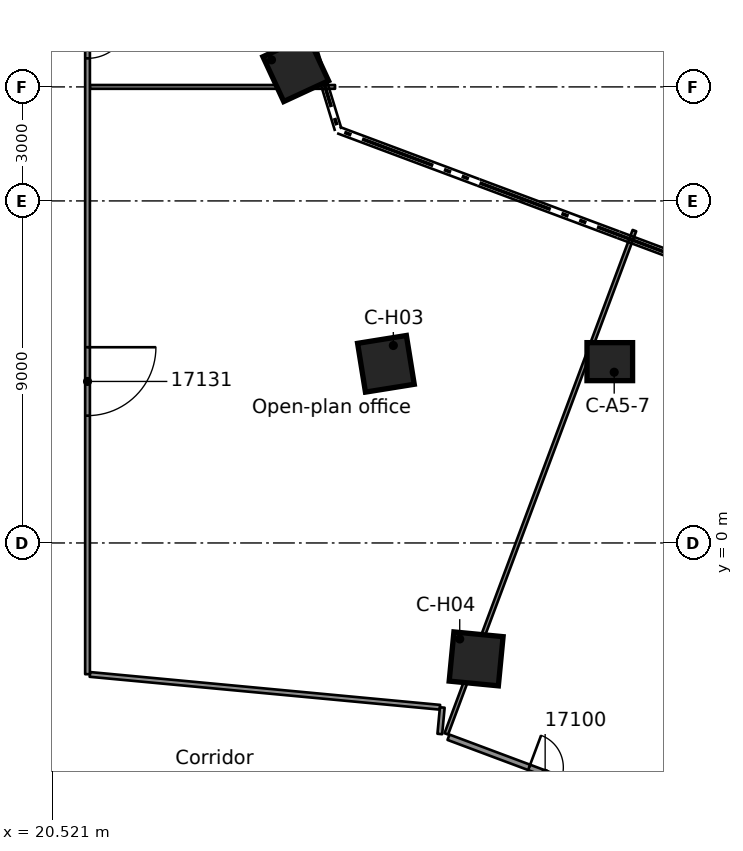
"""IFC4 building model, lengths in metres.
Left out: names, types, materials, properties, quantities, classifications, styles, units other than length and angle.
Written with IfcOpenShell. Run it as: python <this file> out.ifc"""

import sys

from ifc_helpers import new_model, si_unit, direction, frame, frame_2d, origin, origin_2d, place, context, subcontext, project, spatial, rectangle, extrude, element, fill, save


model = new_model("IFC4")
c1 = context("Model", 3, precision=1e-05, world=origin(), true_north=direction((0.0, 1.0)))
c2 = subcontext(c1, "Body", "Model", "MODEL_VIEW")
j1 = project(units=[si_unit("LENGTHUNIT", "METRE"), si_unit("PLANEANGLEUNIT", "RADIAN")], contexts=[c1])
p1 = place(None, origin())
s1 = spatial("IfcSite", under=j1, at=p1, CompositionType="ELEMENT")
p2 = place(p1, origin())
s2 = spatial("IfcBuilding", under=s1, at=p2, CompositionType="ELEMENT")
p3 = place(p2, frame((0.0, 0.0, 84.2)))
s3 = spatial("IfcBuildingStorey", under=s2, at=p3, CompositionType="ELEMENT", Elevation=84.2)
p4 = place(p3, frame((35.193, 4.771, 0.0), z_axis=(0.0, 0.0, 1.0), x_axis=(1.0, 0.0, 0.0)))
e1 = element("IfcColumn", 1, at=p4, inside=s3, PredefinedType="COLUMN", context=c2, shape_type="SweptSolid", body=[
    extrude(rectangle(XDim=1.2, YDim=1.0, at=origin_2d()), origin(), (0.0, 0.0, 1.0), 3.5),
])
for number, where, z_axis, x_axis in (
    (2, (26.929, 12.478, 0.0), (0.0, 0.0, 1.0), (0.907, 0.42, 0.0)),
    (3, (29.302, 4.714, 0.0), (0.0, 0.0, 1.0), (0.987, 0.159, 0.0)),
    (4, (31.676, -3.05, 0.0), (0.0, 0.0, 1.0), (0.995, -0.096, 0.0)),
):
    element("IfcColumn", number, at=place(p3, frame(where, z_axis=z_axis, x_axis=x_axis)), inside=s3, PredefinedType="COLUMN", context=c2, shape_type="SweptSolid", body=[
        extrude(rectangle(XDim=1.3, YDim=1.3, at=origin_2d()), origin(), (0.0, 0.0, 1.0), 3.5),
    ])
p5 = place(p3, frame((30.949, -5.112, 0.0), z_axis=(0.0, 0.0, 1.0), x_axis=(0.936693201773, -0.350151175568, 0.0)))
e5 = element("IfcWall", 5, at=p5, inside=s3, PredefinedType="PARTITIONING", context=c2, shape_type="SweptSolid", body=[
    extrude(rectangle(XDim=22.019, YDim=0.15, at=frame_2d((11.01, 0.0))), origin(), (0.0, 0.0, 1.0), 3.08),
])
p6 = place(p5, frame((2.265, 0.0, 0.0)))
e6 = element("IfcOpeningElement", 6, at=p6, cuts=e5, PredefinedType="OPENING", context=c2, shape_type="SweptSolid", body=[
    extrude(rectangle(XDim=0.9, YDim=2.1, at=frame_2d((0.45, 1.05))), frame((0.0, 0.085, 0.0), z_axis=(0.0, -1.0, 0.0), x_axis=(1.0, 0.0, 0.0)), (0.0, 0.0, 1.0), 0.17),
])
p7 = place(p5, frame((9.021, 0.0, 0.0)))
e7 = element("IfcOpeningElement", 7, at=p7, cuts=e5, PredefinedType="OPENING", context=c2, shape_type="SweptSolid", body=[
    extrude(rectangle(XDim=0.9, YDim=2.1, at=frame_2d((0.45, 1.05))), frame((0.0, 0.085, 0.0), z_axis=(0.0, -1.0, 0.0), x_axis=(1.0, 0.0, 0.0)), (0.0, 0.0, 1.0), 0.17),
])
p8 = place(p5, frame((13.171, 0.0, 0.0)))
e8 = element("IfcOpeningElement", 8, at=p8, cuts=e5, PredefinedType="OPENING", context=c2, shape_type="SweptSolid", body=[
    extrude(rectangle(XDim=0.9, YDim=2.1, at=frame_2d((0.45, 1.05))), frame((0.0, 0.085, 0.0), z_axis=(0.0, -1.0, 0.0), x_axis=(1.0, 0.0, 0.0)), (0.0, 0.0, 1.0), 0.17),
])
p9 = place(p5, frame((18.271, 0.0, 0.0)))
e9 = element("IfcOpeningElement", 9, at=p9, cuts=e5, PredefinedType="OPENING", context=c2, shape_type="SweptSolid", body=[
    extrude(rectangle(XDim=1.8, YDim=2.1, at=frame_2d((0.9, 1.05))), frame((0.0, 0.085, 0.0), z_axis=(0.0, -1.0, 0.0), x_axis=(1.0, 0.0, 0.0)), (0.0, 0.0, 1.0), 0.17),
])
p10 = place(p3, frame((21.512, -3.459, 0.0), z_axis=(0.0, 0.0, 1.0), x_axis=(0.995629319732, -0.093393028057, 0.0)))
e10 = element("IfcWall", 10, at=p10, inside=s3, PredefinedType="PARTITIONING", context=c2, shape_type="SweptSolid", body=[
    extrude(rectangle(XDim=9.251, YDim=0.125, at=frame_2d((4.626, 0.0))), origin(), (0.0, 0.0, 1.0), 3.08),
])
p11 = place(p3, frame((21.512, 12.0, 0.0), z_axis=(0.0, 0.0, 1.0), x_axis=(1.0, 0.0, 0.0)))
e11 = element("IfcWall", 11, at=p11, inside=s3, PredefinedType="PARTITIONING", context=c2, shape_type="SweptSolid", body=[
    extrude(rectangle(XDim=6.451, YDim=0.1, at=frame_2d((3.226, 0.0))), origin(), (0.0, 0.0, 1.0), 3.08),
])
p12 = place(p3, frame((30.891, -5.023, 0.0), z_axis=(0.0, 0.0, 1.0), x_axis=(0.350144786727, 0.936695590001, 0.0)))
e12 = element("IfcWall", 12, at=p12, inside=s3, PredefinedType="PARTITIONING", context=c2, shape_type="SweptSolid", body=[
    extrude(rectangle(XDim=14.137, YDim=0.1, at=frame_2d((7.068, 0.0))), origin(), (0.0, 0.0, 1.0), 3.08),
])
p13 = place(p3, frame((30.72, -5.026, 0.0), z_axis=(0.0, 0.0, 1.0), x_axis=(0.092800329534, 0.995684738679, 0.0)))
e13 = element("IfcWall", 13, at=p13, inside=s3, PredefinedType="PARTITIONING", context=c2, shape_type="SweptSolid", body=[
    extrude(rectangle(XDim=0.7, YDim=0.125, at=frame_2d((0.35, 0.0))), origin(), (0.0, 0.0, 1.0), 3.08),
])
p14 = place(p3, frame((21.45, 14.451, 0.0), z_axis=(0.0, 0.0, 1.0), x_axis=(0.0, -1.0, 0.0)))
e14 = element("IfcWall", 14, at=p14, inside=s3, PredefinedType="PARTITIONING", context=c2, shape_type="SweptSolid", body=[
    extrude(rectangle(XDim=17.904, YDim=0.125, at=frame_2d((8.952, 0.0))), origin(), (0.0, 0.0, 1.0), 3.08),
])
p15 = place(p14, frame((9.301, 0.0, 0.0)))
e15 = element("IfcOpeningElement", 15, at=p15, cuts=e14, PredefinedType="OPENING", context=c2, shape_type="SweptSolid", body=[
    extrude(rectangle(XDim=1.8, YDim=2.1, at=frame_2d((0.9, 1.05))), frame((0.0, 0.073, 0.0), z_axis=(0.0, -1.0, 0.0), x_axis=(1.0, 0.0, 0.0)), (0.0, 0.0, 1.0), 0.145),
])
p16 = place(p14, frame((0.6, 0.0, 0.0)))
e16 = element("IfcOpeningElement", 16, at=p16, cuts=e14, PredefinedType="OPENING", context=c2, shape_type="SweptSolid", body=[
    extrude(rectangle(XDim=1.1, YDim=2.1, at=frame_2d((0.55, 1.05))), frame((0.0, 0.073, 0.0), z_axis=(0.0, -1.0, 0.0), x_axis=(1.0, 0.0, 0.0)), (0.0, 0.0, 1.0), 0.145),
])
p17 = place(p6, origin())
e17 = element("IfcDoor", 17, at=p17, inside=s3, OperationType="SINGLE_SWING_LEFT", PredefinedType="DOOR", context=c2, shape_type="SweptSolid", body=[
    extrude(rectangle(XDim=0.9, YDim=2.1, at=frame_2d((0.45, 1.05))), frame((0.0, 0.025, 0.0), z_axis=(0.0, -1.0, 0.0), x_axis=(1.0, 0.0, 0.0)), (0.0, 0.0, 1.0), 0.05),
])
fill(e6, e17)
p18 = place(p15, origin())
e18 = element("IfcDoor", 18, at=p18, inside=s3, OperationType="DOUBLE_DOOR_SINGLE_SWING", PredefinedType="DOOR", context=c2, shape_type="SweptSolid", body=[
    extrude(rectangle(XDim=1.8, YDim=2.1, at=frame_2d((0.9, 1.05))), frame((0.0, 0.025, 0.0), z_axis=(0.0, -1.0, 0.0), x_axis=(1.0, 0.0, 0.0)), (0.0, 0.0, 1.0), 0.05),
])
fill(e15, e18)
p19 = place(p16, origin())
e19 = element("IfcDoor", 19, at=p19, inside=s3, OperationType="SINGLE_SWING_LEFT", PredefinedType="DOOR", context=c2, shape_type="SweptSolid", body=[
    extrude(rectangle(XDim=1.1, YDim=2.1, at=frame_2d((0.55, 1.05))), frame((0.0, 0.025, 0.0), z_axis=(0.0, -1.0, 0.0), x_axis=(1.0, 0.0, 0.0)), (0.0, 0.0, 1.0), 0.05),
])
fill(e16, e19)
save(model, sys.argv[1])
